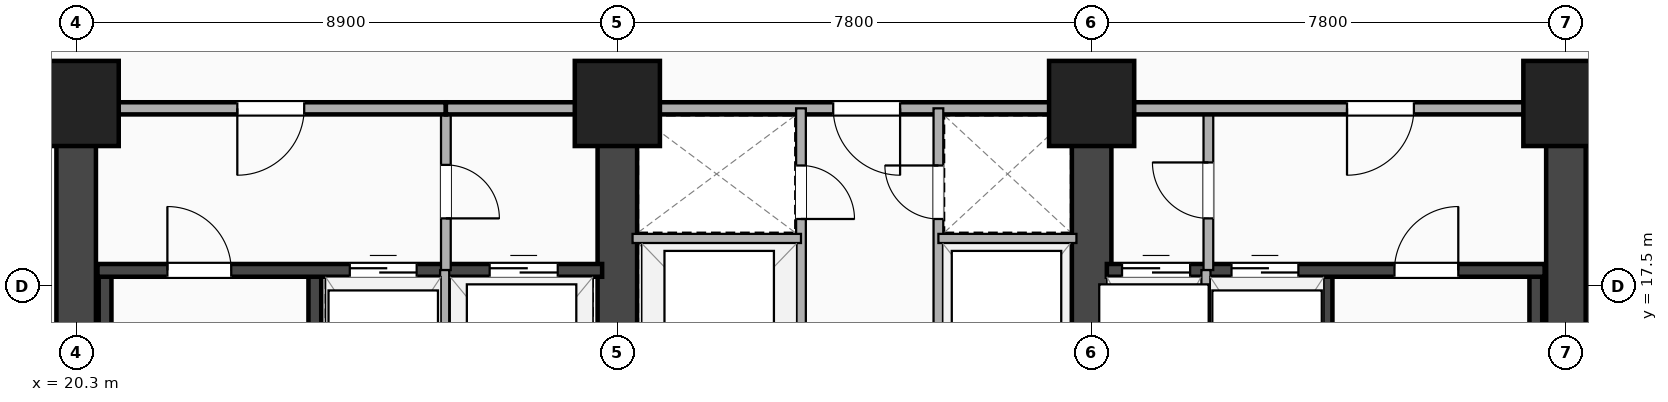
"""IFC4 building model, lengths in metres.
Left out: names, types, materials, properties, quantities, classifications, styles, units other than length and angle.
Written with IfcOpenShell. Run it as: python <this file> out.ifc"""

import sys

from ifc_helpers import new_model, si_unit, direction, frame, frame_2d, origin, origin_2d, place, context, subcontext, project, spatial, rectangle, extrude, element, fill, save


model = new_model("IFC4")
c1 = context("Model", 3, precision=1e-05, world=origin(), true_north=direction((0.0, 1.0)))
c2 = subcontext(c1, "Body", "Model", "MODEL_VIEW")
j1 = project(units=[si_unit("LENGTHUNIT", "METRE"), si_unit("PLANEANGLEUNIT", "RADIAN")], contexts=[c1])
p1 = place(None, origin())
s1 = spatial("IfcSite", under=j1, at=p1, CompositionType="ELEMENT")
p2 = place(p1, origin())
s2 = spatial("IfcBuilding", under=s1, at=p2, CompositionType="ELEMENT")
p3 = place(p2, frame((0.0, 0.0, 68.4)))
s3 = spatial("IfcBuildingStorey", under=s2, at=p3, CompositionType="ELEMENT", Elevation=68.4)
for number, where, z_axis, x_axis in (
    (1, (20.3, 3.5, 0.0), (0.0, 0.0, 1.0), (0.0, 1.0, 0.0)),
    (2, (44.8, 3.5, 0.0), (0.0, 0.0, 1.0), (0.0, 1.0, 0.0)),
):
    element("IfcWall", number, at=place(p3, frame(where, z_axis=z_axis, x_axis=x_axis)), inside=s3, PredefinedType="SHEAR", context=c2, shape_type="SweptSolid", body=[
        extrude(rectangle(XDim=16.9, YDim=0.65, at=frame_2d((8.45, 0.0))), origin(), (0.0, 0.0, 1.0), 3.22),
    ])
p4 = place(p3, frame((29.2, 3.5, 0.0), z_axis=(0.0, 0.0, 1.0), x_axis=(0.0, 1.0, 0.0)))
e3 = element("IfcWall", 3, at=p4, inside=s3, PredefinedType="SHEAR", context=c2, shape_type="SweptSolid", body=[
    extrude(rectangle(XDim=16.9, YDim=0.65, at=frame_2d((8.45, 0.0))), origin(), (0.0, 0.0, 1.0), 3.22),
])
p5 = place(p4, frame((7.75, 0.0, 0.0), z_axis=(0.0, 0.0, 1.0), x_axis=(-1.0, 0.0, 0.0)))
e4 = element("IfcOpeningElement", 4, at=p5, cuts=e3, PredefinedType="OPENING", context=c2, shape_type="SweptSolid", body=[
    extrude(rectangle(XDim=1.1, YDim=2.15, at=frame_2d((0.55, 1.075))), frame((0.0, 0.335, 0.0), z_axis=(0.0, -1.0, 0.0), x_axis=(1.0, 0.0, 0.0)), (0.0, 0.0, 1.0), 0.67),
])
p6 = place(p3, frame((37.0, 3.5, 0.0), z_axis=(0.0, 0.0, 1.0), x_axis=(0.0, 1.0, 0.0)))
e5 = element("IfcWall", 5, at=p6, inside=s3, PredefinedType="SHEAR", context=c2, shape_type="SweptSolid", body=[
    extrude(rectangle(XDim=16.9, YDim=0.65, at=frame_2d((8.45, 0.0))), origin(), (0.0, 0.0, 1.0), 3.22),
])
p7 = place(p6, frame((6.65, 0.0, 0.0)))
e6 = element("IfcOpeningElement", 6, at=p7, cuts=e5, PredefinedType="OPENING", context=c2, shape_type="SweptSolid", body=[
    extrude(rectangle(XDim=1.1, YDim=2.15, at=frame_2d((0.55, 1.075))), frame((0.0, 0.335, 0.0), z_axis=(0.0, -1.0, 0.0), x_axis=(1.0, 0.0, 0.0)), (0.0, 0.0, 1.0), 0.67),
])
for number, where, z_axis, x_axis in (
    (7, (20.775, 9.745, 0.0), (0.0, 0.0, 1.0), (0.0, 1.0, 0.0)),
    (8, (24.225, 9.745, 0.0), (0.0, 0.0, 1.0), (0.0, 1.0, 0.0)),
):
    element("IfcWall", number, at=place(p3, frame(where, z_axis=z_axis, x_axis=x_axis)), inside=s3, PredefinedType="SHEAR", context=c2, shape_type="SweptSolid", body=[
        extrude(rectangle(XDim=8.01, YDim=0.21, at=frame_2d((4.005, 0.0))), origin(), (0.0, 0.0, 1.0), 3.22),
    ])
p8 = place(p3, frame((20.65, 17.755, 0.0), z_axis=(0.0, 0.0, 1.0), x_axis=(1.0, 0.0, 0.0)))
e9 = element("IfcWall", 9, at=p8, inside=s3, PredefinedType="SHEAR", context=c2, shape_type="SweptSolid", body=[
    extrude(rectangle(XDim=8.3, YDim=0.21, at=frame_2d((4.15, 0.0))), origin(), (0.0, 0.0, 1.0), 3.22),
])
p9 = place(p8, frame((2.2, 0.0, 0.0), z_axis=(0.0, 0.0, 1.0), x_axis=(-1.0, 0.0, 0.0)))
e10 = element("IfcOpeningElement", 10, at=p9, cuts=e9, PredefinedType="OPENING", context=c2, shape_type="SweptSolid", body=[
    extrude(rectangle(XDim=1.05, YDim=2.15, at=frame_2d((0.525, 1.075))), frame((0.0, 0.115, 0.0), z_axis=(0.0, -1.0, 0.0), x_axis=(1.0, 0.0, 0.0)), (0.0, 0.0, 1.0), 0.23),
])
p10 = place(p8, frame((4.15, 0.0, 0.0)))
e11 = element("IfcOpeningElement", 11, at=p10, cuts=e9, PredefinedType="OPENING", context=c2, shape_type="SweptSolid", body=[
    extrude(rectangle(XDim=1.1, YDim=2.18, at=frame_2d((0.55, 1.09))), frame((0.0, 0.115, 0.0), z_axis=(0.0, -1.0, 0.0), x_axis=(1.0, 0.0, 0.0)), (0.0, 0.0, 1.0), 0.23),
])
p11 = place(p8, frame((6.45, 0.0, 0.0)))
e12 = element("IfcOpeningElement", 12, at=p11, cuts=e9, PredefinedType="OPENING", context=c2, shape_type="SweptSolid", body=[
    extrude(rectangle(XDim=1.12, YDim=2.2, at=frame_2d((0.56, 1.1))), frame((0.0, 0.115, 0.0), z_axis=(0.0, -1.0, 0.0), x_axis=(1.0, 0.0, 0.0)), (0.0, 0.0, 1.0), 0.23),
])
for number, where, z_axis, x_axis in (
    (13, (40.855, 9.745, 0.0), (0.0, 0.0, 1.0), (0.0, 1.0, 0.0)),
    (14, (44.305, 9.745, 0.0), (0.0, 0.0, 1.0), (0.0, 1.0, 0.0)),
):
    element("IfcWall", number, at=place(p3, frame(where, z_axis=z_axis, x_axis=x_axis)), inside=s3, PredefinedType="SHEAR", context=c2, shape_type="SweptSolid", body=[
        extrude(rectangle(XDim=8.01, YDim=0.21, at=frame_2d((4.005, 0.0))), origin(), (0.0, 0.0, 1.0), 3.22),
    ])
p12 = place(p3, frame((37.25, 17.755, 0.0), z_axis=(0.0, 0.0, 1.0), x_axis=(1.0, 0.0, 0.0)))
e15 = element("IfcWall", 15, at=p12, inside=s3, PredefinedType="SHEAR", context=c2, shape_type="SweptSolid", body=[
    extrude(rectangle(XDim=7.2, YDim=0.21, at=frame_2d((3.6, 0.0))), origin(), (0.0, 0.0, 1.0), 3.22),
])
p13 = place(p12, frame((0.25, 0.0, 0.0)))
e16 = element("IfcOpeningElement", 16, at=p13, cuts=e15, PredefinedType="OPENING", context=c2, shape_type="SweptSolid", body=[
    extrude(rectangle(XDim=1.12, YDim=2.2, at=frame_2d((0.56, 1.1))), frame((0.0, 0.115, 0.0), z_axis=(0.0, -1.0, 0.0), x_axis=(1.0, 0.0, 0.0)), (0.0, 0.0, 1.0), 0.23),
])
p14 = place(p12, frame((2.05, 0.0, 0.0)))
e17 = element("IfcOpeningElement", 17, at=p14, cuts=e15, PredefinedType="OPENING", context=c2, shape_type="SweptSolid", body=[
    extrude(rectangle(XDim=1.1, YDim=2.18, at=frame_2d((0.55, 1.09))), frame((0.0, 0.115, 0.0), z_axis=(0.0, -1.0, 0.0), x_axis=(1.0, 0.0, 0.0)), (0.0, 0.0, 1.0), 0.23),
])
p15 = place(p12, frame((5.78, 0.0, 0.0), z_axis=(0.0, 0.0, 1.0), x_axis=(-1.0, 0.0, 0.0)))
e18 = element("IfcOpeningElement", 18, at=p15, cuts=e15, PredefinedType="OPENING", context=c2, shape_type="SweptSolid", body=[
    extrude(rectangle(XDim=1.05, YDim=2.15, at=frame_2d((0.525, 1.075))), frame((0.0, 0.115, 0.0), z_axis=(0.0, -1.0, 0.0), x_axis=(1.0, 0.0, 0.0)), (0.0, 0.0, 1.0), 0.23),
])
for number, where, z_axis, x_axis in (
    (19, (20.3, 20.5, -0.28), (0.0, 0.0, 1.0), (1.0, 0.0, 0.0)),
    (20, (29.2, 20.5, -0.28), (0.0, 0.0, 1.0), (1.0, 0.0, 0.0)),
    (21, (37.0, 20.5, -0.28), (0.0, 0.0, 1.0), (1.0, 0.0, 0.0)),
    (22, (44.8, 20.5, -0.28), (0.0, 0.0, 1.0), (1.0, 0.0, 0.0)),
):
    element("IfcColumn", number, at=place(p3, frame(where, z_axis=z_axis, x_axis=x_axis)), inside=s3, PredefinedType="COLUMN", context=c2, shape_type="SweptSolid", body=[
        extrude(rectangle(XDim=1.4, YDim=1.4, at=origin_2d()), origin(), (0.0, 0.0, 1.0), 3.5),
    ])
p16 = place(p3, frame((26.38, 17.76, 0.0), z_axis=(0.0, 0.0, 1.0), x_axis=(0.0, 1.0, 0.0)))
e23 = element("IfcWall", 23, at=p16, inside=s3, PredefinedType="PARTITIONING", context=c2, shape_type="SweptSolid", body=[
    extrude(rectangle(XDim=2.66, YDim=0.16, at=frame_2d((1.33, 0.0))), origin(), (0.0, 0.0, 1.0), 2.51),
])
p17 = place(p16, frame((0.85, 0.0, 0.0)))
e24 = element("IfcOpeningElement", 24, at=p17, cuts=e23, PredefinedType="OPENING", context=c2, shape_type="SweptSolid", body=[
    extrude(rectangle(XDim=0.88, YDim=2.08, at=frame_2d((0.44, 1.04))), frame((0.0, 0.09, 0.0), z_axis=(0.0, -1.0, 0.0), x_axis=(1.0, 0.0, 0.0)), (0.0, 0.0, 1.0), 0.18),
])
p18 = place(p3, frame((38.92, 17.76, 0.0), z_axis=(0.0, 0.0, 1.0), x_axis=(0.0, 1.0, 0.0)))
e25 = element("IfcWall", 25, at=p18, inside=s3, PredefinedType="PARTITIONING", context=c2, shape_type="SweptSolid", body=[
    extrude(rectangle(XDim=2.66, YDim=0.16, at=frame_2d((1.33, 0.0))), origin(), (0.0, 0.0, 1.0), 2.51),
])
p19 = place(p18, frame((1.77, 0.0, 0.0), z_axis=(0.0, 0.0, 1.0), x_axis=(-1.0, 0.0, 0.0)))
e26 = element("IfcOpeningElement", 26, at=p19, cuts=e25, PredefinedType="OPENING", context=c2, shape_type="SweptSolid", body=[
    extrude(rectangle(XDim=0.92, YDim=2.08, at=frame_2d((0.46, 1.04))), frame((0.0, 0.09, 0.0), z_axis=(0.0, -1.0, 0.0), x_axis=(1.0, 0.0, 0.0)), (0.0, 0.0, 1.0), 0.18),
])
for number, where, z_axis, x_axis in (
    (27, (26.36, 14.72, 0.0), (0.0, 0.0, 1.0), (0.0, 1.0, 0.0)),
    (28, (38.88, 14.72, 0.0), (0.0, 0.0, 1.0), (0.0, 1.0, 0.0)),
):
    element("IfcWall", number, at=place(p3, frame(where, z_axis=z_axis, x_axis=x_axis)), inside=s3, PredefinedType="PARTITIONING", context=c2, shape_type="SweptSolid", body=[
        extrude(rectangle(XDim=3.04, YDim=0.15, at=frame_2d((1.52, 0.0))), origin(), (0.0, 0.0, 1.0), 3.22),
    ])
p20 = place(p3, frame((20.65, 20.42, 0.0), z_axis=(0.0, 0.0, 1.0), x_axis=(1.0, 0.0, 0.0)))
e29 = element("IfcWall", 29, at=p20, inside=s3, PredefinedType="PARTITIONING", context=c2, shape_type="SweptSolid", body=[
    extrude(rectangle(XDim=5.73, YDim=0.2, at=frame_2d((2.865, 0.0))), origin(), (0.0, 0.0, 1.0), 2.51),
])
p21 = place(p20, frame((2.3, 0.0, 0.0)))
e30 = element("IfcOpeningElement", 30, at=p21, cuts=e29, PredefinedType="OPENING", context=c2, shape_type="SweptSolid", body=[
    extrude(rectangle(XDim=1.1, YDim=2.15, at=frame_2d((0.55, 1.075))), frame((0.0, 0.11, 0.0), z_axis=(0.0, -1.0, 0.0), x_axis=(1.0, 0.0, 0.0)), (0.0, 0.0, 1.0), 0.22),
])
p22 = place(p3, frame((26.38, 20.42, 0.0), z_axis=(0.0, 0.0, 1.0), x_axis=(1.0, 0.0, 0.0)))
e31 = element("IfcWall", 31, at=p22, inside=s3, PredefinedType="PARTITIONING", context=c2, shape_type="SweptSolid", body=[
    extrude(rectangle(XDim=2.82, YDim=0.2, at=frame_2d((1.41, 0.0))), origin(), (0.0, 0.0, 1.0), 2.51),
])
p23 = place(p3, frame((29.2, 20.42, 0.0), z_axis=(0.0, 0.0, 1.0), x_axis=(1.0, 0.0, 0.0)))
e32 = element("IfcWall", 32, at=p23, inside=s3, PredefinedType="PARTITIONING", context=c2, shape_type="SweptSolid", body=[
    extrude(rectangle(XDim=7.8, YDim=0.2, at=frame_2d((3.9, 0.0))), origin(), (0.0, 0.0, 1.0), 2.51),
])
p24 = place(p23, frame((3.55, 0.0, 0.0)))
e33 = element("IfcOpeningElement", 33, at=p24, cuts=e32, PredefinedType="OPENING", context=c2, shape_type="SweptSolid", body=[
    extrude(rectangle(XDim=1.1, YDim=2.15, at=frame_2d((0.55, 1.075))), frame((0.0, 0.11, 0.0), z_axis=(0.0, -1.0, 0.0), x_axis=(1.0, 0.0, 0.0)), (0.0, 0.0, 1.0), 0.22),
])
p25 = place(p3, frame((37.0, 20.42, 0.0), z_axis=(0.0, 0.0, 1.0), x_axis=(1.0, 0.0, 0.0)))
e34 = element("IfcWall", 34, at=p25, inside=s3, PredefinedType="PARTITIONING", context=c2, shape_type="SweptSolid", body=[
    extrude(rectangle(XDim=7.45, YDim=0.2, at=frame_2d((3.725, 0.0))), origin(), (0.0, 0.0, 1.0), 2.51),
])
p26 = place(p25, frame((4.2, 0.0, 0.0)))
e35 = element("IfcOpeningElement", 35, at=p26, cuts=e34, PredefinedType="OPENING", context=c2, shape_type="SweptSolid", body=[
    extrude(rectangle(XDim=1.1, YDim=2.15, at=frame_2d((0.55, 1.075))), frame((0.0, 0.11, 0.0), z_axis=(0.0, -1.0, 0.0), x_axis=(1.0, 0.0, 0.0)), (0.0, 0.0, 1.0), 0.22),
])
p27 = place(p3, frame((32.22, 12.5, 0.0), z_axis=(0.0, 0.0, 1.0), x_axis=(0.0, 1.0, 0.0)))
e36 = element("IfcWall", 36, at=p27, inside=s3, PredefinedType="PARTITIONING", context=c2, shape_type="SweptSolid", body=[
    extrude(rectangle(XDim=7.92, YDim=0.16, at=frame_2d((3.96, 0.0))), origin(), (0.0, 0.0, 1.0), 2.51),
])
p28 = place(p27, frame((6.1, 0.0, 0.0)))
e37 = element("IfcOpeningElement", 37, at=p28, cuts=e36, PredefinedType="OPENING", context=c2, shape_type="SweptSolid", body=[
    extrude(rectangle(XDim=0.88, YDim=2.08, at=frame_2d((0.44, 1.04))), frame((0.0, 0.09, 0.0), z_axis=(0.0, -1.0, 0.0), x_axis=(1.0, 0.0, 0.0)), (0.0, 0.0, 1.0), 0.18),
])
p29 = place(p3, frame((34.48, 12.5, 0.0), z_axis=(0.0, 0.0, 1.0), x_axis=(0.0, 1.0, 0.0)))
e38 = element("IfcWall", 38, at=p29, inside=s3, PredefinedType="PARTITIONING", context=c2, shape_type="SweptSolid", body=[
    extrude(rectangle(XDim=7.92, YDim=0.16, at=frame_2d((3.96, 0.0))), origin(), (0.0, 0.0, 1.0), 2.51),
])
p30 = place(p29, frame((6.98, 0.0, 0.0), z_axis=(0.0, 0.0, 1.0), x_axis=(-1.0, 0.0, 0.0)))
e39 = element("IfcOpeningElement", 39, at=p30, cuts=e38, PredefinedType="OPENING", context=c2, shape_type="SweptSolid", body=[
    extrude(rectangle(XDim=0.88, YDim=2.08, at=frame_2d((0.44, 1.04))), frame((0.0, 0.09, 0.0), z_axis=(0.0, -1.0, 0.0), x_axis=(1.0, 0.0, 0.0)), (0.0, 0.0, 1.0), 0.18),
])
p31 = place(p3, frame((29.45, 18.28, 0.0), z_axis=(0.0, 0.0, 1.0), x_axis=(1.0, 0.0, 0.0)))
e40 = element("IfcWall", 40, at=p31, inside=s3, PredefinedType="PARTITIONING", context=c2, shape_type="SweptSolid", body=[
    extrude(rectangle(XDim=2.77, YDim=0.15, at=frame_2d((1.385, 0.0))), origin(), (0.0, 0.0, 1.0), 3.22),
])
p32 = place(p3, frame((34.48, 18.28, 0.0), z_axis=(0.0, 0.0, 1.0), x_axis=(1.0, 0.0, 0.0)))
e41 = element("IfcWall", 41, at=p32, inside=s3, PredefinedType="PARTITIONING", context=c2, shape_type="SweptSolid", body=[
    extrude(rectangle(XDim=2.27, YDim=0.15, at=frame_2d((1.135, 0.0))), origin(), (0.0, 0.0, 1.0), 3.22),
])
p33 = place(p3, frame((18.65, 20.42, 0.0), z_axis=(0.0, 0.0, 1.0), x_axis=(1.0, 0.0, 0.0)))
e42 = element("IfcWall", 42, at=p33, inside=s3, PredefinedType="PARTITIONING", context=c2, shape_type="SweptSolid", body=[
    extrude(rectangle(XDim=1.65, YDim=0.16, at=frame_2d((0.825, 0.0))), origin(), (0.0, 0.0, 1.0), 2.51),
])
p34 = place(p3, frame((44.8, 20.42, 0.0), z_axis=(0.0, 0.0, 1.0), x_axis=(1.0, 0.0, 0.0)))
e43 = element("IfcWall", 43, at=p34, inside=s3, PredefinedType="PARTITIONING", context=c2, shape_type="SweptSolid", body=[
    extrude(rectangle(XDim=1.65, YDim=0.16, at=frame_2d((0.825, 0.0))), origin(), (0.0, 0.0, 1.0), 2.51),
])
p35 = place(p9, origin())
e44 = element("IfcDoor", 44, at=p35, inside=s3, OperationType="SINGLE_SWING_LEFT", PredefinedType="DOOR", context=c2, shape_type="SweptSolid", body=[
    extrude(rectangle(XDim=1.05, YDim=2.15, at=frame_2d((0.525, 1.075))), frame((0.0, 0.025, 0.0), z_axis=(0.0, -1.0, 0.0), x_axis=(1.0, 0.0, 0.0)), (0.0, 0.0, 1.0), 0.05),
])
fill(e10, e44)
p36 = place(p10, origin())
e45 = element("IfcDoor", 45, at=p36, inside=s3, OperationType="DOUBLE_DOOR_SLIDING", PredefinedType="DOOR", context=c2, shape_type="SweptSolid", body=[
    extrude(rectangle(XDim=1.1, YDim=2.18, at=frame_2d((0.55, 1.09))), frame((0.0, 0.025, 0.0), z_axis=(0.0, -1.0, 0.0), x_axis=(1.0, 0.0, 0.0)), (0.0, 0.0, 1.0), 0.05),
])
fill(e11, e45)
p37 = place(p11, origin())
e46 = element("IfcDoor", 46, at=p37, inside=s3, OperationType="DOUBLE_DOOR_SLIDING", PredefinedType="DOOR", context=c2, shape_type="SweptSolid", body=[
    extrude(rectangle(XDim=1.12, YDim=2.2, at=frame_2d((0.56, 1.1))), frame((0.0, 0.025, 0.0), z_axis=(0.0, -1.0, 0.0), x_axis=(1.0, 0.0, 0.0)), (0.0, 0.0, 1.0), 0.05),
])
fill(e12, e46)
p38 = place(p13, origin())
e47 = element("IfcDoor", 47, at=p38, inside=s3, OperationType="DOUBLE_DOOR_SLIDING", PredefinedType="DOOR", context=c2, shape_type="SweptSolid", body=[
    extrude(rectangle(XDim=1.12, YDim=2.2, at=frame_2d((0.56, 1.1))), frame((0.0, 0.025, 0.0), z_axis=(0.0, -1.0, 0.0), x_axis=(1.0, 0.0, 0.0)), (0.0, 0.0, 1.0), 0.05),
])
fill(e16, e47)
p39 = place(p14, origin())
e48 = element("IfcDoor", 48, at=p39, inside=s3, OperationType="DOUBLE_DOOR_SLIDING", PredefinedType="DOOR", context=c2, shape_type="SweptSolid", body=[
    extrude(rectangle(XDim=1.1, YDim=2.18, at=frame_2d((0.55, 1.09))), frame((0.0, 0.025, 0.0), z_axis=(0.0, -1.0, 0.0), x_axis=(1.0, 0.0, 0.0)), (0.0, 0.0, 1.0), 0.05),
])
fill(e17, e48)
p40 = place(p15, origin())
e49 = element("IfcDoor", 49, at=p40, inside=s3, OperationType="SINGLE_SWING_RIGHT", PredefinedType="DOOR", context=c2, shape_type="SweptSolid", body=[
    extrude(rectangle(XDim=1.05, YDim=2.15, at=frame_2d((0.525, 1.075))), frame((0.0, 0.025, 0.0), z_axis=(0.0, -1.0, 0.0), x_axis=(1.0, 0.0, 0.0)), (0.0, 0.0, 1.0), 0.05),
])
fill(e18, e49)
p41 = place(p17, origin())
e50 = element("IfcDoor", 50, at=p41, inside=s3, OperationType="SINGLE_SWING_LEFT", PredefinedType="DOOR", context=c2, shape_type="SweptSolid", body=[
    extrude(rectangle(XDim=0.88, YDim=2.08, at=frame_2d((0.44, 1.04))), frame((0.0, 0.025, 0.0), z_axis=(0.0, -1.0, 0.0), x_axis=(1.0, 0.0, 0.0)), (0.0, 0.0, 1.0), 0.05),
])
fill(e24, e50)
p42 = place(p19, origin())
e51 = element("IfcDoor", 51, at=p42, inside=s3, OperationType="SINGLE_SWING_RIGHT", PredefinedType="DOOR", context=c2, shape_type="SweptSolid", body=[
    extrude(rectangle(XDim=0.92, YDim=2.08, at=frame_2d((0.46, 1.04))), frame((0.0, 0.025, 0.0), z_axis=(0.0, -1.0, 0.0), x_axis=(1.0, 0.0, 0.0)), (0.0, 0.0, 1.0), 0.05),
])
fill(e26, e51)
p43 = place(p21, origin())
e52 = element("IfcDoor", 52, at=p43, inside=s3, OperationType="SINGLE_SWING_LEFT", PredefinedType="DOOR", context=c2, shape_type="SweptSolid", body=[
    extrude(rectangle(XDim=1.1, YDim=2.15, at=frame_2d((0.55, 1.075))), frame((0.0, 0.025, 0.0), z_axis=(0.0, -1.0, 0.0), x_axis=(1.0, 0.0, 0.0)), (0.0, 0.0, 1.0), 0.05),
])
fill(e30, e52)
p44 = place(p24, origin())
e53 = element("IfcDoor", 53, at=p44, inside=s3, OperationType="SINGLE_SWING_RIGHT", PredefinedType="DOOR", context=c2, shape_type="SweptSolid", body=[
    extrude(rectangle(XDim=1.1, YDim=2.15, at=frame_2d((0.55, 1.075))), frame((0.0, 0.025, 0.0), z_axis=(0.0, -1.0, 0.0), x_axis=(1.0, 0.0, 0.0)), (0.0, 0.0, 1.0), 0.05),
])
fill(e33, e53)
p45 = place(p26, origin())
e54 = element("IfcDoor", 54, at=p45, inside=s3, OperationType="SINGLE_SWING_LEFT", PredefinedType="DOOR", context=c2, shape_type="SweptSolid", body=[
    extrude(rectangle(XDim=1.1, YDim=2.15, at=frame_2d((0.55, 1.075))), frame((0.0, 0.025, 0.0), z_axis=(0.0, -1.0, 0.0), x_axis=(1.0, 0.0, 0.0)), (0.0, 0.0, 1.0), 0.05),
])
fill(e35, e54)
p46 = place(p28, origin())
e55 = element("IfcDoor", 55, at=p46, inside=s3, OperationType="SINGLE_SWING_LEFT", PredefinedType="DOOR", context=c2, shape_type="SweptSolid", body=[
    extrude(rectangle(XDim=0.88, YDim=2.08, at=frame_2d((0.44, 1.04))), frame((0.0, 0.025, 0.0), z_axis=(0.0, -1.0, 0.0), x_axis=(1.0, 0.0, 0.0)), (0.0, 0.0, 1.0), 0.05),
])
fill(e37, e55)
p47 = place(p30, origin())
e56 = element("IfcDoor", 56, at=p47, inside=s3, OperationType="SINGLE_SWING_RIGHT", PredefinedType="DOOR", context=c2, shape_type="SweptSolid", body=[
    extrude(rectangle(XDim=0.88, YDim=2.08, at=frame_2d((0.44, 1.04))), frame((0.0, 0.025, 0.0), z_axis=(0.0, -1.0, 0.0), x_axis=(1.0, 0.0, 0.0)), (0.0, 0.0, 1.0), 0.05),
])
fill(e39, e56)
save(model, sys.argv[1])
